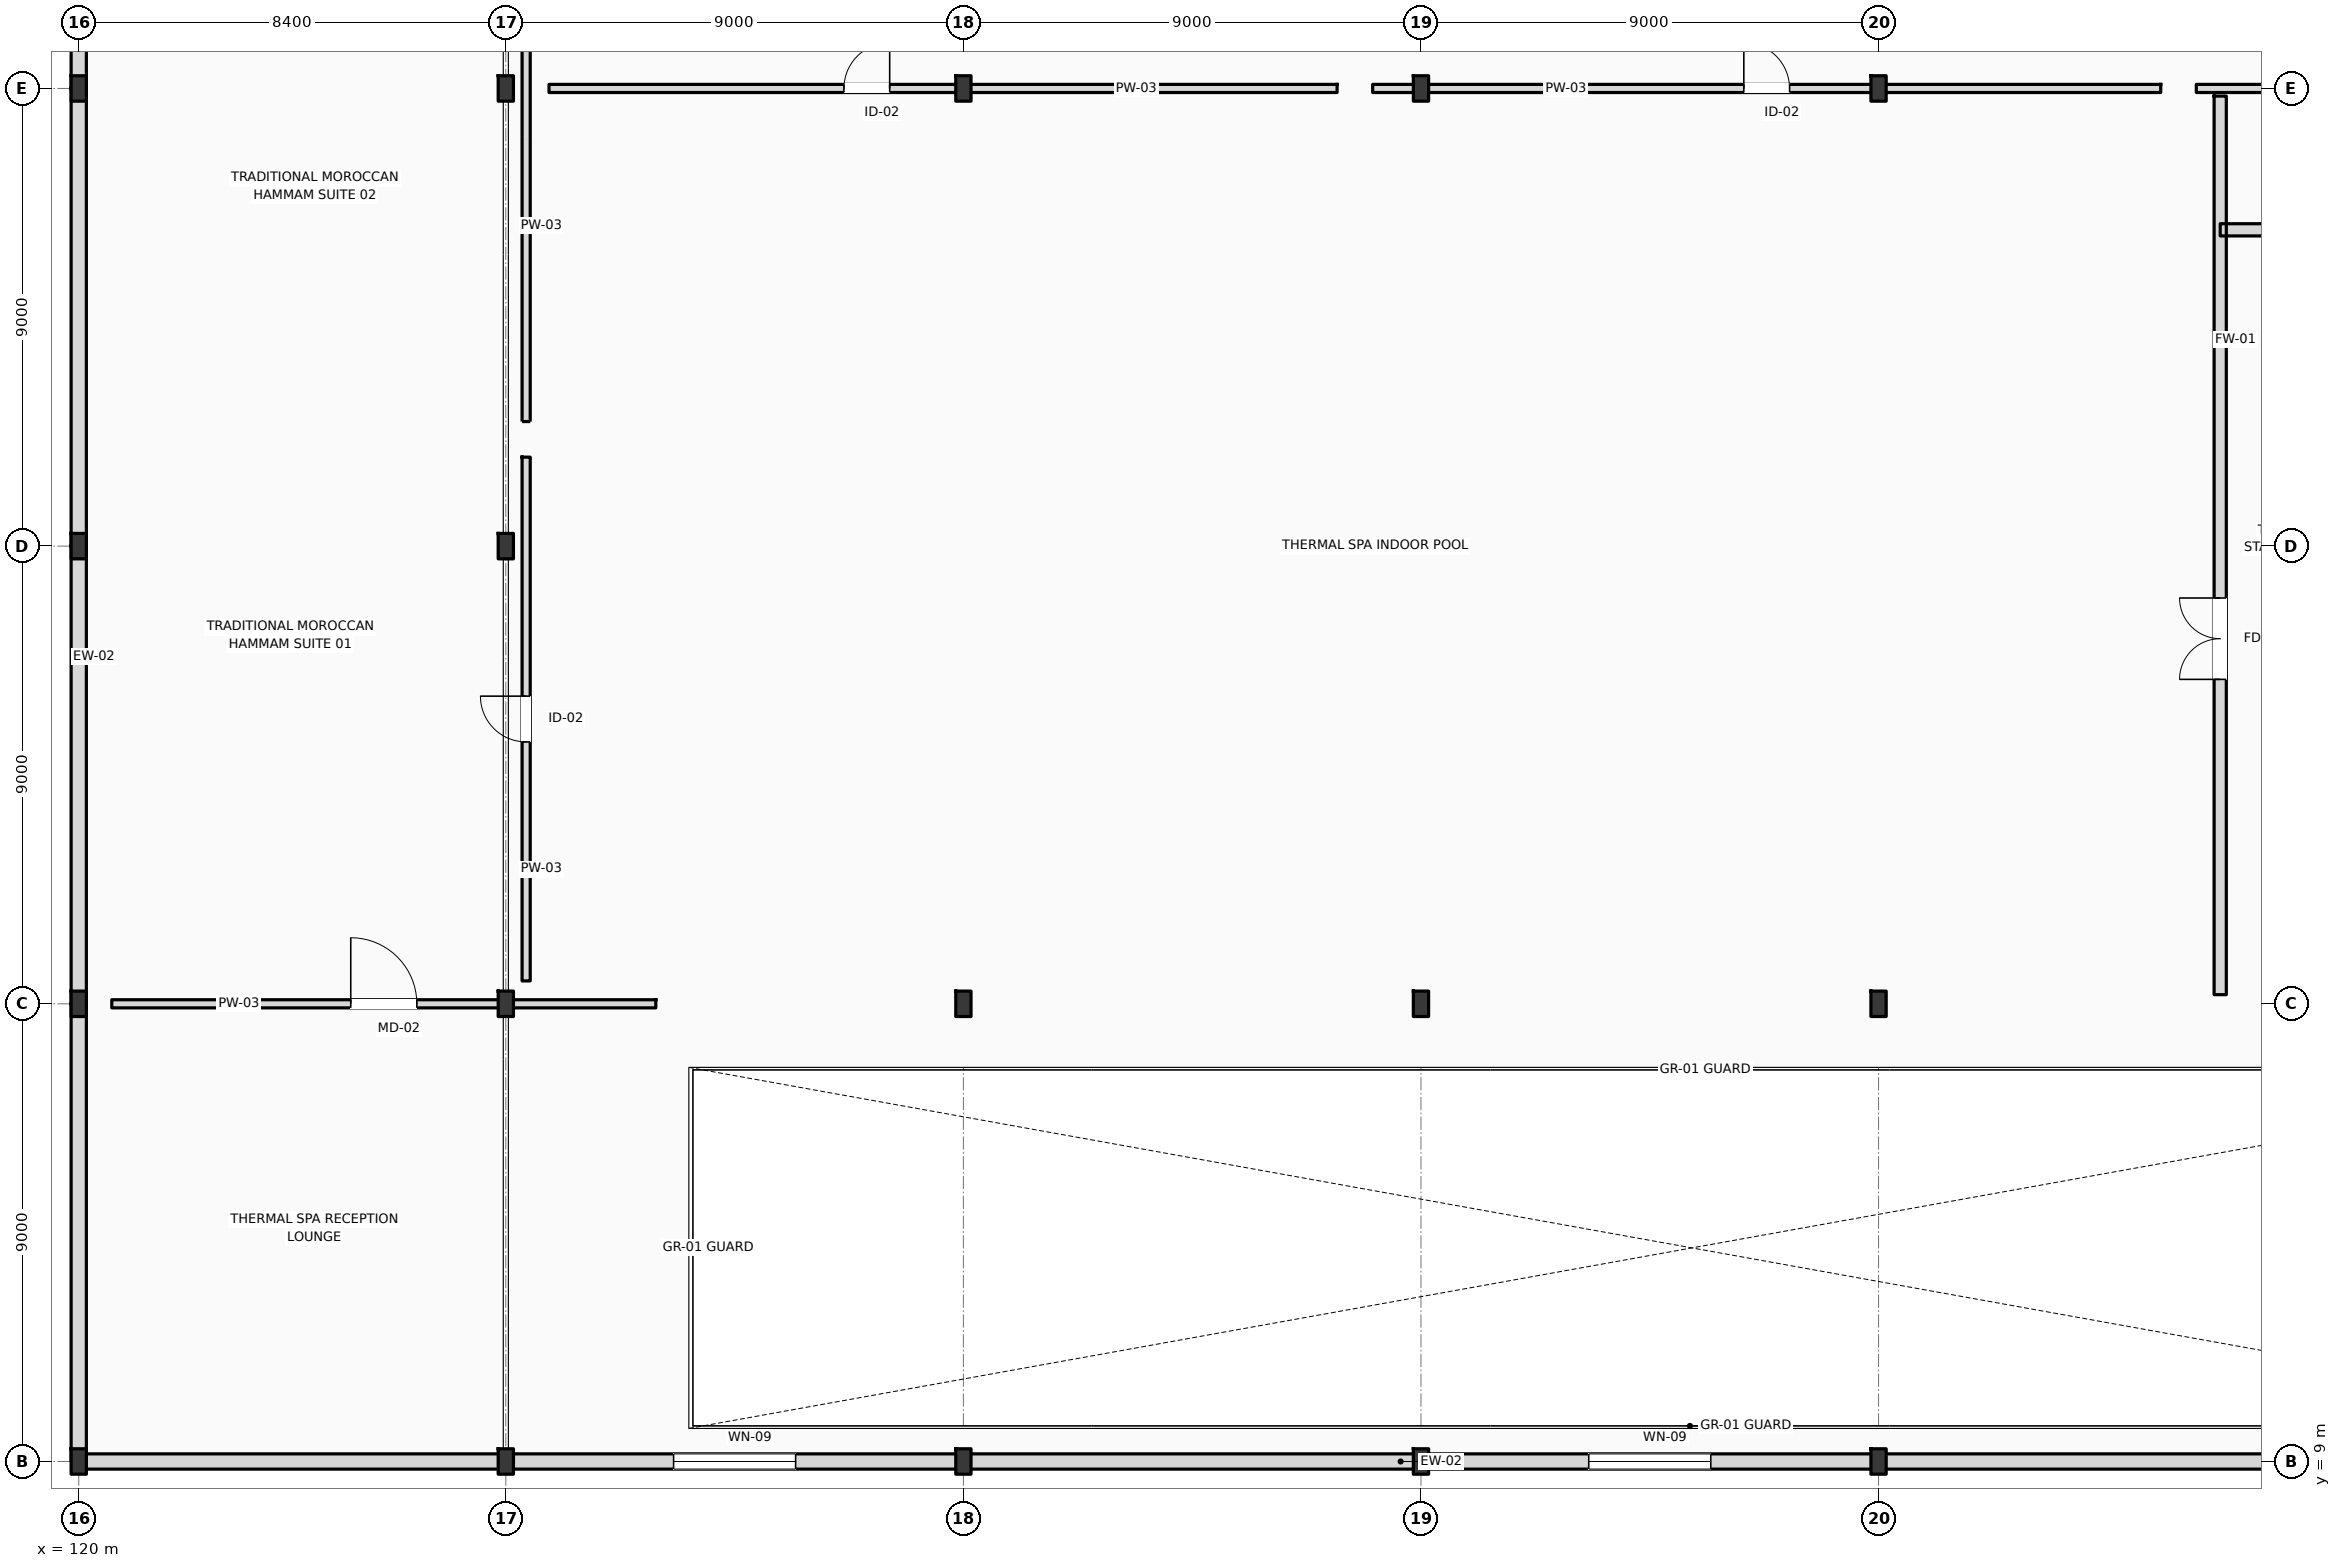
"""IFC4 building model, lengths in metres.
Left out: names, types, materials, properties, quantities, classifications, styles, units other than length and angle.
Written with IfcOpenShell. Run it as: python <this file> out.ifc"""

import sys

from ifc_helpers import new_model, si_unit, direction, frame, frame_2d, origin, origin_2d, place, context, subcontext, project, spatial, rectangle, i_section, extrude, element, fill, save


model = new_model("IFC4")
c1 = context("Model", 3, precision=1e-05, world=origin(), true_north=direction((0.0, 1.0)))
c2 = subcontext(c1, "Body", "Model", "MODEL_VIEW")
j1 = project(units=[si_unit("LENGTHUNIT", "METRE"), si_unit("PLANEANGLEUNIT", "RADIAN")], contexts=[c1])
p1 = place(None, origin())
s1 = spatial("IfcSite", under=j1, at=p1, CompositionType="ELEMENT")
p2 = place(p1, origin())
s2 = spatial("IfcBuilding", under=s1, at=p2, CompositionType="ELEMENT")
p3 = place(p2, origin())
s3 = spatial("IfcBuildingStorey", under=s2, at=p3, CompositionType="ELEMENT", Elevation=0.0)
for number, where, z_axis, x_axis in (
    (1, (120.0, 9.0, 0.0), (0.0, 0.0, 1.0), (1.0, 0.0, 0.0)),
    (2, (120.0, 18.0, 0.0), (0.0, 0.0, 1.0), (1.0, 0.0, 0.0)),
    (3, (120.0, 27.0, 0.0), (0.0, 0.0, 1.0), (1.0, 0.0, 0.0)),
    (4, (120.0, 36.0, 0.0), (0.0, 0.0, 1.0), (1.0, 0.0, 0.0)),
    (5, (128.4, 9.0, 0.0), (0.0, 0.0, 1.0), (1.0, 0.0, 0.0)),
    (6, (128.4, 18.0, 0.0), (0.0, 0.0, 1.0), (1.0, 0.0, 0.0)),
    (7, (128.4, 27.0, 0.0), (0.0, 0.0, 1.0), (1.0, 0.0, 0.0)),
    (8, (128.4, 36.0, 0.0), (0.0, 0.0, 1.0), (1.0, 0.0, 0.0)),
    (9, (137.4, 9.0, 0.0), (0.0, 0.0, 1.0), (1.0, 0.0, 0.0)),
    (10, (137.4, 18.0, 0.0), (0.0, 0.0, 1.0), (1.0, 0.0, 0.0)),
    (11, (137.4, 36.0, 0.0), (0.0, 0.0, 1.0), (1.0, 0.0, 0.0)),
    (12, (146.4, 9.0, 0.0), (0.0, 0.0, 1.0), (1.0, 0.0, 0.0)),
    (13, (146.4, 18.0, 0.0), (0.0, 0.0, 1.0), (1.0, 0.0, 0.0)),
    (14, (146.4, 36.0, 0.0), (0.0, 0.0, 1.0), (1.0, 0.0, 0.0)),
    (15, (155.4, 9.0, 0.0), (0.0, 0.0, 1.0), (1.0, 0.0, 0.0)),
    (16, (155.4, 18.0, 0.0), (0.0, 0.0, 1.0), (1.0, 0.0, 0.0)),
    (17, (155.4, 36.0, 0.0), (0.0, 0.0, 1.0), (1.0, 0.0, 0.0)),
):
    element("IfcColumn", number, at=place(p3, frame(where, z_axis=z_axis, x_axis=x_axis)), inside=s3, PredefinedType="COLUMN", context=c2, shape_type="SweptSolid", body=[
        extrude(i_section(OverallWidth=0.3, OverallDepth=0.5, WebThickness=0.014, FlangeThickness=0.028, FilletRadius=0.027, at=origin_2d()), origin(), (0.0, 0.0, 1.0), 6.0),
    ])
p4 = place(p3, frame((120.0, 9.0, 0.0), z_axis=(0.0, 0.0, 1.0), x_axis=(1.0, 0.0, 0.0)))
e18 = element("IfcWall", 18, at=p4, inside=s3, PredefinedType="STANDARD", context=c2, shape_type="SweptSolid", body=[
    extrude(rectangle(XDim=8.4, YDim=0.3, at=frame_2d((4.2, 0.0))), origin(), (0.0, 0.0, 1.0), 5.14),
])
p5 = place(p3, frame((128.4, 9.0, 0.0), z_axis=(0.0, 0.0, 1.0), x_axis=(1.0, 0.0, 0.0)))
e19 = element("IfcWall", 19, at=p5, inside=s3, PredefinedType="STANDARD", context=c2, shape_type="SweptSolid", body=[
    extrude(rectangle(XDim=9.0, YDim=0.3, at=frame_2d((4.5, 0.0))), origin(), (0.0, 0.0, 1.0), 5.09),
])
p6 = place(p5, frame((3.3, 0.0, 1.05)))
e20 = element("IfcOpeningElement", 20, at=p6, cuts=e19, PredefinedType="OPENING", context=c2, shape_type="SweptSolid", body=[
    extrude(rectangle(XDim=2.4, YDim=2.6, at=frame_2d((1.2, 1.3))), frame((0.0, 0.16, 0.0), z_axis=(0.0, -1.0, 0.0), x_axis=(1.0, 0.0, 0.0)), (0.0, 0.0, 1.0), 0.32),
])
p7 = place(p3, frame((137.4, 9.0, 0.0), z_axis=(0.0, 0.0, 1.0), x_axis=(1.0, 0.0, 0.0)))
e21 = element("IfcWall", 21, at=p7, inside=s3, PredefinedType="STANDARD", context=c2, shape_type="SweptSolid", body=[
    extrude(rectangle(XDim=9.0, YDim=0.3, at=frame_2d((4.5, 0.0))), origin(), (0.0, 0.0, 1.0), 5.09),
])
p8 = place(p3, frame((146.4, 9.0, 0.0), z_axis=(0.0, 0.0, 1.0), x_axis=(1.0, 0.0, 0.0)))
e22 = element("IfcWall", 22, at=p8, inside=s3, PredefinedType="STANDARD", context=c2, shape_type="SweptSolid", body=[
    extrude(rectangle(XDim=9.0, YDim=0.3, at=frame_2d((4.5, 0.0))), origin(), (0.0, 0.0, 1.0), 5.09),
])
p9 = place(p8, frame((3.3, 0.0, 1.05)))
e23 = element("IfcOpeningElement", 23, at=p9, cuts=e22, PredefinedType="OPENING", context=c2, shape_type="SweptSolid", body=[
    extrude(rectangle(XDim=2.4, YDim=2.6, at=frame_2d((1.2, 1.3))), frame((0.0, 0.16, 0.0), z_axis=(0.0, -1.0, 0.0), x_axis=(1.0, 0.0, 0.0)), (0.0, 0.0, 1.0), 0.32),
])
p10 = place(p3, frame((155.4, 9.0, 0.0), z_axis=(0.0, 0.0, 1.0), x_axis=(1.0, 0.0, 0.0)))
e24 = element("IfcWall", 24, at=p10, inside=s3, PredefinedType="STANDARD", context=c2, shape_type="SweptSolid", body=[
    extrude(rectangle(XDim=9.0, YDim=0.3, at=frame_2d((4.5, 0.0))), origin(), (0.0, 0.0, 1.0), 5.09),
])
for number, where, z_axis, x_axis in (
    (25, (120.0, 9.0, 0.0), (0.0, 0.0, 1.0), (0.0, 1.0, 0.0)),
    (26, (120.0, 18.0, 0.0), (0.0, 0.0, 1.0), (0.0, 1.0, 0.0)),
    (27, (120.0, 27.0, 0.0), (0.0, 0.0, 1.0), (0.0, 1.0, 0.0)),
    (28, (120.0, 36.0, 0.0), (0.0, 0.0, 1.0), (0.0, 1.0, 0.0)),
):
    element("IfcWall", number, at=place(p3, frame(where, z_axis=z_axis, x_axis=x_axis)), inside=s3, PredefinedType="STANDARD", context=c2, shape_type="SweptSolid", body=[
        extrude(rectangle(XDim=9.0, YDim=0.3, at=frame_2d((4.5, 0.0))), origin(), (0.0, 0.0, 1.0), 5.2),
    ])
p11 = place(p3, frame((128.8, 18.45, 0.0), z_axis=(0.0, 0.0, 1.0), x_axis=(0.0, 1.0, 0.0)))
e29 = element("IfcWall", 29, at=p11, inside=s3, PredefinedType="PARTITIONING", context=c2, shape_type="SweptSolid", body=[
    extrude(rectangle(XDim=10.3, YDim=0.16, at=frame_2d((5.15, 0.0))), origin(), (0.0, 0.0, 1.0), 5.7),
])
p12 = place(p11, frame((4.7, 0.0, 0.0)))
e30 = element("IfcOpeningElement", 30, at=p12, cuts=e29, PredefinedType="OPENING", context=c2, shape_type="SweptSolid", body=[
    extrude(rectangle(XDim=0.9, YDim=2.1, at=frame_2d((0.45, 1.05))), frame((0.0, 0.09, 0.0), z_axis=(0.0, -1.0, 0.0), x_axis=(1.0, 0.0, 0.0)), (0.0, 0.0, 1.0), 0.18),
])
p13 = place(p3, frame((128.8, 29.45, 0.0), z_axis=(0.0, 0.0, 1.0), x_axis=(0.0, 1.0, 0.0)))
e31 = element("IfcWall", 31, at=p13, inside=s3, PredefinedType="PARTITIONING", context=c2, shape_type="SweptSolid", body=[
    extrude(rectangle(XDim=14.9, YDim=0.16, at=frame_2d((7.45, 0.0))), origin(), (0.0, 0.0, 1.0), 5.7),
])
p14 = place(p13, frame((8.0, 0.0, 0.0)))
e32 = element("IfcOpeningElement", 32, at=p14, cuts=e31, PredefinedType="OPENING", context=c2, shape_type="SweptSolid", body=[
    extrude(rectangle(XDim=0.9, YDim=2.1, at=frame_2d((0.45, 1.05))), frame((0.0, 0.09, 0.0), z_axis=(0.0, -1.0, 0.0), x_axis=(1.0, 0.0, 0.0)), (0.0, 0.0, 1.0), 0.18),
])
p15 = place(p3, frame((129.25, 36.0, 0.0), z_axis=(0.0, 0.0, 1.0), x_axis=(1.0, 0.0, 0.0)))
e33 = element("IfcWall", 33, at=p15, inside=s3, PredefinedType="PARTITIONING", context=c2, shape_type="SweptSolid", body=[
    extrude(rectangle(XDim=15.5, YDim=0.16, at=frame_2d((7.75, 0.0))), origin(), (0.0, 0.0, 1.0), 5.09),
])
p16 = place(p15, frame((5.8, 0.0, 0.0)))
e34 = element("IfcOpeningElement", 34, at=p16, cuts=e33, PredefinedType="OPENING", context=c2, shape_type="SweptSolid", body=[
    extrude(rectangle(XDim=0.9, YDim=2.1, at=frame_2d((0.45, 1.05))), frame((0.0, 0.09, 0.0), z_axis=(0.0, -1.0, 0.0), x_axis=(1.0, 0.0, 0.0)), (0.0, 0.0, 1.0), 0.18),
])
p17 = place(p3, frame((145.45, 36.0, 0.0), z_axis=(0.0, 0.0, 1.0), x_axis=(1.0, 0.0, 0.0)))
e35 = element("IfcWall", 35, at=p17, inside=s3, PredefinedType="PARTITIONING", context=c2, shape_type="SweptSolid", body=[
    extrude(rectangle(XDim=15.5, YDim=0.16, at=frame_2d((7.75, 0.0))), origin(), (0.0, 0.0, 1.0), 5.09),
])
p18 = place(p17, frame((7.3, 0.0, 0.0)))
e36 = element("IfcOpeningElement", 36, at=p18, cuts=e35, PredefinedType="OPENING", context=c2, shape_type="SweptSolid", body=[
    extrude(rectangle(XDim=0.9, YDim=2.1, at=frame_2d((0.45, 1.05))), frame((0.0, 0.09, 0.0), z_axis=(0.0, -1.0, 0.0), x_axis=(1.0, 0.0, 0.0)), (0.0, 0.0, 1.0), 0.18),
])
p19 = place(p3, frame((161.65, 36.0, 0.0), z_axis=(0.0, 0.0, 1.0), x_axis=(1.0, 0.0, 0.0)))
e37 = element("IfcWall", 37, at=p19, inside=s3, PredefinedType="PARTITIONING", context=c2, shape_type="SweptSolid", body=[
    extrude(rectangle(XDim=9.7, YDim=0.16, at=frame_2d((4.85, 0.0))), origin(), (0.0, 0.0, 1.0), 5.09),
])
p20 = place(p19, frame((4.38, 0.0, 0.0)))
e38 = element("IfcOpeningElement", 38, at=p20, cuts=e37, PredefinedType="OPENING", context=c2, shape_type="SweptSolid", body=[
    extrude(rectangle(XDim=0.94, YDim=2.15, at=frame_2d((0.47, 1.075))), frame((0.0, 0.09, 0.0), z_axis=(0.0, -1.0, 0.0), x_axis=(1.0, 0.0, 0.0)), (0.0, 0.0, 1.0), 0.18),
])
p21 = place(p3, frame((120.65, 18.0, 0.0), z_axis=(0.0, 0.0, 1.0), x_axis=(1.0, 0.0, 0.0)))
e39 = element("IfcWall", 39, at=p21, inside=s3, PredefinedType="PARTITIONING", context=c2, shape_type="SweptSolid", body=[
    extrude(rectangle(XDim=10.7, YDim=0.16, at=frame_2d((5.35, 0.0))), origin(), (0.0, 0.0, 1.0), 5.09),
])
p22 = place(p21, frame((4.7, 0.0, 0.0)))
e40 = element("IfcOpeningElement", 40, at=p22, cuts=e39, PredefinedType="OPENING", context=c2, shape_type="SweptSolid", body=[
    extrude(rectangle(XDim=1.3, YDim=2.2, at=frame_2d((0.65, 1.1))), frame((0.0, 0.09, 0.0), z_axis=(0.0, -1.0, 0.0), x_axis=(1.0, 0.0, 0.0)), (0.0, 0.0, 1.0), 0.18),
])
p23 = place(p3, frame((162.12, 18.18, 0.0), z_axis=(0.0, 0.0, 1.0), x_axis=(0.0, 1.0, 0.0)))
e41 = element("IfcWall", 41, at=p23, inside=s3, PredefinedType="STANDARD", context=c2, shape_type="SweptSolid", body=[
    extrude(rectangle(XDim=17.67, YDim=0.24, at=frame_2d((8.835, 0.0))), origin(), (0.0, 0.0, 1.0), 5.7),
])
p24 = place(p23, frame((6.2, 0.0, 0.0)))
e42 = element("IfcOpeningElement", 42, at=p24, cuts=e41, PredefinedType="OPENING", context=c2, shape_type="SweptSolid", body=[
    extrude(rectangle(XDim=1.6, YDim=2.2, at=frame_2d((0.8, 1.1))), frame((0.0, 0.13, 0.0), z_axis=(0.0, -1.0, 0.0), x_axis=(1.0, 0.0, 0.0)), (0.0, 0.0, 1.0), 0.26),
])
p25 = place(p3, frame((162.12, 33.22, 0.0), z_axis=(0.0, 0.0, 1.0), x_axis=(1.0, 0.0, 0.0)))
e43 = element("IfcWall", 43, at=p25, inside=s3, PredefinedType="STANDARD", context=c2, shape_type="SweptSolid", body=[
    extrude(rectangle(XDim=9.7, YDim=0.24, at=frame_2d((4.85, 0.0))), origin(), (0.0, 0.0, 1.0), 5.7),
])
p26 = place(p6, origin())
e44 = element("IfcWindow", 44, at=p26, inside=s3, PartitioningType="DOUBLE_PANEL_VERTICAL", PredefinedType="WINDOW", context=c2, shape_type="SweptSolid", body=[
    extrude(rectangle(XDim=2.4, YDim=2.6, at=frame_2d((1.2, 1.3))), frame((0.0, 0.03, 0.0), z_axis=(0.0, -1.0, 0.0), x_axis=(1.0, 0.0, 0.0)), (0.0, 0.0, 1.0), 0.06),
])
fill(e20, e44)
p27 = place(p9, origin())
e45 = element("IfcWindow", 45, at=p27, inside=s3, PartitioningType="DOUBLE_PANEL_VERTICAL", PredefinedType="WINDOW", context=c2, shape_type="SweptSolid", body=[
    extrude(rectangle(XDim=2.4, YDim=2.6, at=frame_2d((1.2, 1.3))), frame((0.0, 0.03, 0.0), z_axis=(0.0, -1.0, 0.0), x_axis=(1.0, 0.0, 0.0)), (0.0, 0.0, 1.0), 0.06),
])
fill(e23, e45)
p28 = place(p12, origin())
e46 = element("IfcDoor", 46, at=p28, inside=s3, OperationType="SINGLE_SWING_RIGHT", PredefinedType="DOOR", context=c2, shape_type="SweptSolid", body=[
    extrude(rectangle(XDim=0.9, YDim=2.1, at=frame_2d((0.45, 1.05))), frame((0.0, 0.025, 0.0), z_axis=(0.0, -1.0, 0.0), x_axis=(1.0, 0.0, 0.0)), (0.0, 0.0, 1.0), 0.05),
])
fill(e30, e46)
p29 = place(p16, origin())
e47 = element("IfcDoor", 47, at=p29, inside=s3, OperationType="SINGLE_SWING_RIGHT", PredefinedType="DOOR", context=c2, shape_type="SweptSolid", body=[
    extrude(rectangle(XDim=0.9, YDim=2.1, at=frame_2d((0.45, 1.05))), frame((0.0, 0.025, 0.0), z_axis=(0.0, -1.0, 0.0), x_axis=(1.0, 0.0, 0.0)), (0.0, 0.0, 1.0), 0.05),
])
fill(e34, e47)
p30 = place(p18, origin())
e48 = element("IfcDoor", 48, at=p30, inside=s3, OperationType="SINGLE_SWING_LEFT", PredefinedType="DOOR", context=c2, shape_type="SweptSolid", body=[
    extrude(rectangle(XDim=0.9, YDim=2.1, at=frame_2d((0.45, 1.05))), frame((0.0, 0.025, 0.0), z_axis=(0.0, -1.0, 0.0), x_axis=(1.0, 0.0, 0.0)), (0.0, 0.0, 1.0), 0.05),
])
fill(e36, e48)
p31 = place(p22, origin())
e49 = element("IfcDoor", 49, at=p31, inside=s3, OperationType="SINGLE_SWING_LEFT", PredefinedType="DOOR", context=c2, shape_type="SweptSolid", body=[
    extrude(rectangle(XDim=1.3, YDim=2.2, at=frame_2d((0.65, 1.1))), frame((0.0, 0.025, 0.0), z_axis=(0.0, -1.0, 0.0), x_axis=(1.0, 0.0, 0.0)), (0.0, 0.0, 1.0), 0.05),
])
fill(e40, e49)
p32 = place(p24, origin())
e50 = element("IfcDoor", 50, at=p32, inside=s3, OperationType="DOUBLE_SWING_LEFT", PredefinedType="DOOR", context=c2, shape_type="SweptSolid", body=[
    extrude(rectangle(XDim=1.6, YDim=2.2, at=frame_2d((0.8, 1.1))), frame((0.0, 0.025, 0.0), z_axis=(0.0, -1.0, 0.0), x_axis=(1.0, 0.0, 0.0)), (0.0, 0.0, 1.0), 0.05),
])
fill(e42, e50)
save(model, sys.argv[1])
